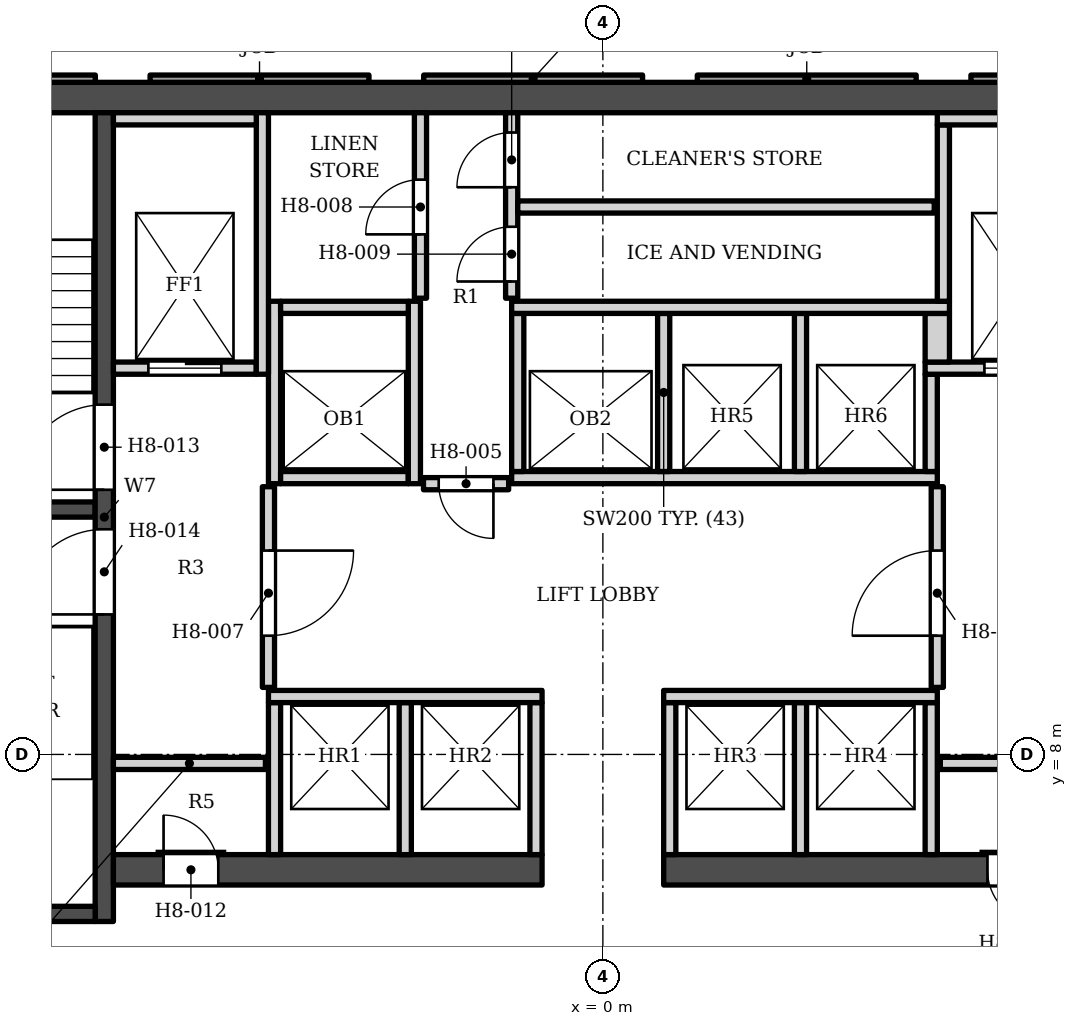
"""IFC4 building model, lengths in metres.
Left out: names, types, materials, properties, quantities, classifications, styles, units other than length and angle.
Written with IfcOpenShell. Run it as: python <this file> out.ifc"""

import sys

from ifc_helpers import new_model, si_unit, direction, frame, frame_2d, origin, place, context, subcontext, project, spatial, polyline, rectangle, outline, extrude, element, fill, save


model = new_model("IFC4")
c1 = context("Model", 3, precision=1e-05, world=origin(), true_north=direction((0.0, 1.0)))
c2 = subcontext(c1, "Body", "Model", "MODEL_VIEW")
j1 = project(units=[si_unit("LENGTHUNIT", "METRE"), si_unit("PLANEANGLEUNIT", "RADIAN")], contexts=[c1])
p1 = place(None, origin())
s1 = spatial("IfcSite", under=j1, at=p1, CompositionType="ELEMENT")
p2 = place(p1, origin())
s2 = spatial("IfcBuilding", under=s1, at=p2, CompositionType="ELEMENT")
p3 = place(p2, frame((0.0, 0.0, 122.4)))
s3 = spatial("IfcBuildingStorey", under=s2, at=p3, CompositionType="ELEMENT", Elevation=122.4)
p4 = place(p3, frame((-16.9, 18.802, 0.0), z_axis=(0.0, 0.0, 1.0), x_axis=(1.0, 0.0, 0.0)))
e1 = element("IfcWall", 1, at=p4, inside=s3, PredefinedType="SHEAR", context=c2, shape_type="SweptSolid", body=[
    extrude(rectangle(XDim=33.8, YDim=0.5, at=frame_2d((16.9, 0.0))), origin(), (0.0, 0.0, 1.0), 3.4),
])
p5 = place(p3, frame((-8.2, 5.253, 0.0), z_axis=(0.0, 0.0, 1.0), x_axis=(0.0, 1.0, 0.0)))
e2 = element("IfcWall", 2, at=p5, inside=s3, PredefinedType="SHEAR", context=c2, shape_type="SweptSolid", body=[
    extrude(rectangle(XDim=13.3, YDim=0.3, at=frame_2d((6.65, 0.0))), origin(), (0.0, 0.0, 1.0), 3.4),
])
p6 = place(p5, frame((7.1, 0.0, 0.0)))
e3 = element("IfcOpeningElement", 3, at=p6, cuts=e2, PredefinedType="OPENING", context=c2, shape_type="SweptSolid", body=[
    extrude(rectangle(XDim=1.4, YDim=2.1, at=frame_2d((0.7, 1.05))), frame((0.0, 0.16, 0.0), z_axis=(0.0, -1.0, 0.0), x_axis=(1.0, 0.0, 0.0)), (0.0, 0.0, 1.0), 0.32),
])
p7 = place(p5, frame((5.05, 0.0, 0.0)))
e4 = element("IfcOpeningElement", 4, at=p7, cuts=e2, PredefinedType="OPENING", context=c2, shape_type="SweptSolid", body=[
    extrude(rectangle(XDim=1.4, YDim=2.1, at=frame_2d((0.7, 1.05))), frame((0.0, 0.16, 0.0), z_axis=(0.0, -1.0, 0.0), x_axis=(1.0, 0.0, 0.0)), (0.0, 0.0, 1.0), 0.32),
])
for number, where, z_axis, x_axis in (
    (5, (-12.1, 12.028, 0.0), (0.0, 0.0, 1.0), (1.0, 0.0, 0.0)),
    (6, (-12.1, 5.378, 0.0), (0.0, 0.0, 1.0), (1.0, 0.0, 0.0)),
):
    element("IfcWall", number, at=place(p3, frame(where, z_axis=z_axis, x_axis=x_axis)), inside=s3, PredefinedType="SHEAR", context=c2, shape_type="SweptSolid", body=[
        extrude(rectangle(XDim=3.75, YDim=0.25, at=frame_2d((1.875, 0.0))), origin(), (0.0, 0.0, 1.0), 3.4),
    ])
p8 = place(p3, frame((-8.05, 6.103, 0.0), z_axis=(0.0, 0.0, 1.0), x_axis=(1.0, 0.0, 0.0)))
e7 = element("IfcWall", 7, at=p8, inside=s3, PredefinedType="SHEAR", context=c2, shape_type="SweptSolid", body=[
    extrude(rectangle(XDim=7.05, YDim=0.5, at=frame_2d((3.525, 0.0))), origin(), (0.0, 0.0, 1.0), 3.4),
])
p9 = place(p8, frame((0.825, 0.0, 0.0)))
e8 = element("IfcOpeningElement", 8, at=p9, cuts=e7, PredefinedType="OPENING", context=c2, shape_type="SweptSolid", body=[
    extrude(rectangle(XDim=0.9, YDim=2.1, at=frame_2d((0.45, 1.05))), frame((0.0, 0.26, 0.0), z_axis=(0.0, -1.0, 0.0), x_axis=(1.0, 0.0, 0.0)), (0.0, 0.0, 1.0), 0.52),
])
p10 = place(p3, frame((1.0, 6.103, 0.0), z_axis=(0.0, 0.0, 1.0), x_axis=(1.0, 0.0, 0.0)))
e9 = element("IfcWall", 9, at=p10, inside=s3, PredefinedType="SHEAR", context=c2, shape_type="SweptSolid", body=[
    extrude(rectangle(XDim=7.05, YDim=0.5, at=frame_2d((3.525, 0.0))), origin(), (0.0, 0.0, 1.0), 3.4),
])
p11 = place(p10, frame((5.325, 0.0, 0.0)))
e10 = element("IfcOpeningElement", 10, at=p11, cuts=e9, PredefinedType="OPENING", context=c2, shape_type="SweptSolid", body=[
    extrude(rectangle(XDim=0.9, YDim=2.1, at=frame_2d((0.45, 1.05))), frame((0.0, 0.26, 0.0), z_axis=(0.0, -1.0, 0.0), x_axis=(1.0, 0.0, 0.0)), (0.0, 0.0, 1.0), 0.52),
])
p12 = place(p3, origin())
e11 = element("IfcWall", 11, at=p12, inside=s3, PredefinedType="ELEMENTEDWALL", context=c2, shape_type="SweptSolid", body=[
    extrude(outline(polyline([(6.053, 19.173), (6.053, 19.052), (9.653, 19.052), (9.653, 19.173), (6.053, 19.173)])), origin(), (0.0, 0.0, 1.0), 2.65),
])
p13 = place(p3, origin())
e12 = element("IfcWall", 12, at=p13, inside=s3, PredefinedType="SOLIDWALL", context=c2, shape_type="SweptSolid", body=[
    extrude(outline(polyline([(1.553, 19.173), (1.553, 19.052), (5.153, 19.052), (5.153, 19.173), (1.553, 19.173)])), origin(), (0.0, 0.0, 1.0), 2.65),
])
p14 = place(p3, origin())
e13 = element("IfcWall", 13, at=p14, inside=s3, PredefinedType="ELEMENTEDWALL", context=c2, shape_type="SweptSolid", body=[
    extrude(outline(polyline([(-2.947, 19.173), (-2.947, 19.052), (0.653, 19.052), (0.653, 19.173), (-2.947, 19.173)])), origin(), (0.0, 0.0, 1.0), 2.65),
])
p15 = place(p3, origin())
e14 = element("IfcWall", 14, at=p15, inside=s3, PredefinedType="SOLIDWALL", context=c2, shape_type="SweptSolid", body=[
    extrude(outline(polyline([(-7.447, 19.173), (-7.447, 19.052), (-3.847, 19.052), (-3.847, 19.173), (-7.447, 19.173)])), origin(), (0.0, 0.0, 1.0), 2.65),
])
p16 = place(p3, origin())
e15 = element("IfcWall", 15, at=p16, inside=s3, PredefinedType="ELEMENTEDWALL", context=c2, shape_type="SweptSolid", body=[
    extrude(outline(polyline([(-11.947, 19.173), (-11.947, 19.052), (-8.347, 19.052), (-8.347, 19.173), (-11.947, 19.173)])), origin(), (0.0, 0.0, 1.0), 2.65),
])
for number, where, z_axis, x_axis in (
    (16, (-5.4, 6.353, 0.0), (0.0, 0.0, 1.0), (0.0, 1.0, 0.0)),
    (17, (-3.25, 6.353, 0.0), (0.0, 0.0, 1.0), (0.0, 1.0, 0.0)),
    (18, (-1.1, 6.353, 0.0), (0.0, 0.0, 1.0), (0.0, 1.0, 0.0)),
    (19, (1.1, 6.353, 0.0), (0.0, 0.0, 1.0), (0.0, 1.0, 0.0)),
    (20, (3.25, 6.353, 0.0), (0.0, 0.0, 1.0), (0.0, 1.0, 0.0)),
    (21, (5.4, 6.353, 0.0), (0.0, 0.0, 1.0), (0.0, 1.0, 0.0)),
    (22, (-8.05, 7.853, 0.0), (0.0, 0.0, 1.0), (1.0, 0.0, 0.0)),
    (23, (5.55, 7.853, 0.0), (0.0, 0.0, 1.0), (1.0, 0.0, 0.0)),
):
    element("IfcWall", number, at=place(p3, frame(where, z_axis=z_axis, x_axis=x_axis)), inside=s3, PredefinedType="SOLIDWALL", context=c2, shape_type="SweptSolid", body=[
        extrude(rectangle(XDim=2.5, YDim=0.2, at=frame_2d((1.25, 0.0))), origin(), (0.0, 0.0, 1.0), 3.23),
    ])
for number, where, z_axis, x_axis in (
    (24, (-5.5, 8.953, 0.0), (0.0, 0.0, 1.0), (1.0, 0.0, 0.0)),
    (25, (1.0, 8.953, 0.0), (0.0, 0.0, 1.0), (1.0, 0.0, 0.0)),
):
    element("IfcWall", number, at=place(p3, frame(where, z_axis=z_axis, x_axis=x_axis)), inside=s3, PredefinedType="SOLIDWALL", context=c2, shape_type="SweptSolid", body=[
        extrude(rectangle(XDim=4.5, YDim=0.2, at=frame_2d((2.25, 0.0))), origin(), (0.0, 0.0, 1.0), 3.23),
    ])
p17 = place(p3, frame((-5.5, 9.103, 0.0), z_axis=(0.0, 0.0, 1.0), x_axis=(0.0, 1.0, 0.0)))
e26 = element("IfcWall", 26, at=p17, inside=s3, PredefinedType="SOLIDWALL", context=c2, shape_type="SweptSolid", body=[
    extrude(rectangle(XDim=3.3, YDim=0.2, at=frame_2d((1.65, 0.0))), origin(), (0.0, 0.0, 1.0), 3.23),
])
p18 = place(p17, frame((0.85, 0.0, 0.0)))
e27 = element("IfcOpeningElement", 27, at=p18, cuts=e26, PredefinedType="OPENING", context=c2, shape_type="SweptSolid", body=[
    extrude(rectangle(XDim=1.4, YDim=2.1, at=frame_2d((0.7, 1.05))), frame((0.0, 0.11, 0.0), z_axis=(0.0, -1.0, 0.0), x_axis=(1.0, 0.0, 0.0)), (0.0, 0.0, 1.0), 0.22),
])
p19 = place(p3, frame((5.5, 9.103, 0.0), z_axis=(0.0, 0.0, 1.0), x_axis=(0.0, 1.0, 0.0)))
e28 = element("IfcWall", 28, at=p19, inside=s3, PredefinedType="SOLIDWALL", context=c2, shape_type="SweptSolid", body=[
    extrude(rectangle(XDim=3.3, YDim=0.2, at=frame_2d((1.65, 0.0))), origin(), (0.0, 0.0, 1.0), 3.23),
])
p20 = place(p19, frame((0.85, 0.0, 0.0)))
e29 = element("IfcOpeningElement", 29, at=p20, cuts=e28, PredefinedType="OPENING", context=c2, shape_type="SweptSolid", body=[
    extrude(rectangle(XDim=1.4, YDim=2.1, at=frame_2d((0.7, 1.05))), frame((0.0, 0.11, 0.0), z_axis=(0.0, -1.0, 0.0), x_axis=(1.0, 0.0, 0.0)), (0.0, 0.0, 1.0), 0.22),
])
p21 = place(p3, frame((-2.95, 12.453, 0.0), z_axis=(0.0, 0.0, 1.0), x_axis=(1.0, 0.0, 0.0)))
e30 = element("IfcWall", 30, at=p21, inside=s3, PredefinedType="SOLIDWALL", context=c2, shape_type="SweptSolid", body=[
    extrude(rectangle(XDim=1.4, YDim=0.2, at=frame_2d((0.7, 0.0))), origin(), (0.0, 0.0, 1.0), 3.23),
])
p22 = place(p21, frame((0.25, 0.0, 0.0)))
e31 = element("IfcOpeningElement", 31, at=p22, cuts=e30, PredefinedType="OPENING", context=c2, shape_type="SweptSolid", body=[
    extrude(rectangle(XDim=0.9, YDim=2.1, at=frame_2d((0.45, 1.05))), frame((0.0, 0.11, 0.0), z_axis=(0.0, -1.0, 0.0), x_axis=(1.0, 0.0, 0.0)), (0.0, 0.0, 1.0), 0.22),
])
p23 = place(p3, frame((-5.4, 12.453, 0.0), z_axis=(0.0, 0.0, 1.0), x_axis=(0.0, 1.0, 0.0)))
e32 = element("IfcWall", 32, at=p23, inside=s3, PredefinedType="SOLIDWALL", context=c2, shape_type="SweptSolid", body=[
    extrude(rectangle(XDim=3.0, YDim=0.2, at=frame_2d((1.5, 0.0))), origin(), (0.0, 0.0, 1.0), 3.23),
])
p24 = place(p3, frame((-5.3, 12.552, 0.0), z_axis=(0.0, 0.0, 1.0), x_axis=(1.0, 0.0, 0.0)))
e33 = element("IfcWall", 33, at=p24, inside=s3, PredefinedType="SOLIDWALL", context=c2, shape_type="SweptSolid", body=[
    extrude(rectangle(XDim=2.1, YDim=0.2, at=frame_2d((1.05, 0.0))), origin(), (0.0, 0.0, 1.0), 3.23),
])
p25 = place(p3, frame((-3.1, 12.453, 0.0), z_axis=(0.0, 0.0, 1.0), x_axis=(0.0, 1.0, 0.0)))
e34 = element("IfcWall", 34, at=p25, inside=s3, PredefinedType="SOLIDWALL", context=c2, shape_type="SweptSolid", body=[
    extrude(rectangle(XDim=3.0, YDim=0.2, at=frame_2d((1.5, 0.0))), origin(), (0.0, 0.0, 1.0), 3.23),
])
p26 = place(p3, frame((-1.5, 12.552, 0.0), z_axis=(0.0, 0.0, 1.0), x_axis=(1.0, 0.0, 0.0)))
e35 = element("IfcWall", 35, at=p26, inside=s3, PredefinedType="SOLIDWALL", context=c2, shape_type="SweptSolid", body=[
    extrude(rectangle(XDim=7.0, YDim=0.2, at=frame_2d((3.5, 0.0))), origin(), (0.0, 0.0, 1.0), 3.23),
])
for number, where, z_axis, x_axis in (
    (36, (-1.4, 12.653, 0.0), (0.0, 0.0, 1.0), (0.0, 1.0, 0.0)),
    (37, (1.0, 12.653, 0.0), (0.0, 0.0, 1.0), (0.0, 1.0, 0.0)),
    (38, (3.25, 12.653, 0.0), (0.0, 0.0, 1.0), (0.0, 1.0, 0.0)),
):
    element("IfcWall", number, at=place(p3, frame(where, z_axis=z_axis, x_axis=x_axis)), inside=s3, PredefinedType="SOLIDWALL", context=c2, shape_type="SweptSolid", body=[
        extrude(rectangle(XDim=2.6, YDim=0.2, at=frame_2d((1.3, 0.0))), origin(), (0.0, 0.0, 1.0), 3.23),
    ])
p27 = place(p3, frame((5.4, 12.653, 0.0), z_axis=(0.0, 0.0, 1.0), x_axis=(0.0, 1.0, 0.0)))
e39 = element("IfcWall", 39, at=p27, inside=s3, PredefinedType="SOLIDWALL", context=c2, shape_type="SweptSolid", body=[
    extrude(rectangle(XDim=1.6, YDim=0.2, at=frame_2d((0.8, 0.0))), origin(), (0.0, 0.0, 1.0), 3.23),
])
p28 = place(p3, frame((-8.05, 14.353, 0.0), z_axis=(0.0, 0.0, 1.0), x_axis=(1.0, 0.0, 0.0)))
e40 = element("IfcWall", 40, at=p28, inside=s3, PredefinedType="SOLIDWALL", context=c2, shape_type="SweptSolid", body=[
    extrude(rectangle(XDim=2.35, YDim=0.2, at=frame_2d((1.175, 0.0))), origin(), (0.0, 0.0, 1.0), 3.23),
])
p29 = place(p28, frame((0.575, 0.0, 0.0)))
e41 = element("IfcOpeningElement", 41, at=p29, cuts=e40, PredefinedType="OPENING", context=c2, shape_type="SweptSolid", body=[
    extrude(rectangle(XDim=1.2, YDim=2.1, at=frame_2d((0.6, 1.05))), frame((0.0, 0.11, 0.0), z_axis=(0.0, -1.0, 0.0), x_axis=(1.0, 0.0, 0.0)), (0.0, 0.0, 1.0), 0.22),
])
p30 = place(p3, frame((-5.6, 14.253, 0.0), z_axis=(0.0, 0.0, 1.0), x_axis=(0.0, 1.0, 0.0)))
e42 = element("IfcWall", 42, at=p30, inside=s3, PredefinedType="SOLIDWALL", context=c2, shape_type="SweptSolid", body=[
    extrude(rectangle(XDim=4.3, YDim=0.2, at=frame_2d((2.15, 0.0))), origin(), (0.0, 0.0, 1.0), 3.23),
])
p31 = place(p3, frame((5.3, 14.353, 0.0), z_axis=(0.0, 0.0, 1.0), x_axis=(1.0, 0.0, 0.0)))
e43 = element("IfcWall", 43, at=p31, inside=s3, PredefinedType="SOLIDWALL", context=c2, shape_type="SweptSolid", body=[
    extrude(rectangle(XDim=2.75, YDim=0.2, at=frame_2d((1.375, 0.0))), origin(), (0.0, 0.0, 1.0), 3.23),
])
p32 = place(p31, frame((0.975, 0.0, 0.0)))
e44 = element("IfcOpeningElement", 44, at=p32, cuts=e43, PredefinedType="OPENING", context=c2, shape_type="SweptSolid", body=[
    extrude(rectangle(XDim=1.2, YDim=2.1, at=frame_2d((0.6, 1.05))), frame((0.0, 0.11, 0.0), z_axis=(0.0, -1.0, 0.0), x_axis=(1.0, 0.0, 0.0)), (0.0, 0.0, 1.0), 0.22),
])
p33 = place(p3, frame((5.5, 14.453, 0.0), z_axis=(0.0, 0.0, 1.0), x_axis=(0.0, 1.0, 0.0)))
e45 = element("IfcWall", 45, at=p33, inside=s3, PredefinedType="SOLIDWALL", context=c2, shape_type="SweptSolid", body=[
    extrude(rectangle(XDim=0.8, YDim=0.4, at=frame_2d((0.4, 0.0))), origin(), (0.0, 0.0, 1.0), 3.23),
])
p34 = place(p3, frame((-5.3, 15.353, 0.0), z_axis=(0.0, 0.0, 1.0), x_axis=(1.0, 0.0, 0.0)))
e46 = element("IfcWall", 46, at=p34, inside=s3, PredefinedType="SOLIDWALL", context=c2, shape_type="SweptSolid", body=[
    extrude(rectangle(XDim=2.1, YDim=0.2, at=frame_2d((1.05, 0.0))), origin(), (0.0, 0.0, 1.0), 3.23),
])
p35 = place(p3, frame((-1.5, 15.353, 0.0), z_axis=(0.0, 0.0, 1.0), x_axis=(1.0, 0.0, 0.0)))
e47 = element("IfcWall", 47, at=p35, inside=s3, PredefinedType="SOLIDWALL", context=c2, shape_type="SweptSolid", body=[
    extrude(rectangle(XDim=7.2, YDim=0.2, at=frame_2d((3.6, 0.0))), origin(), (0.0, 0.0, 1.0), 3.23),
])
p36 = place(p3, frame((5.6, 15.453, 0.0), z_axis=(0.0, 0.0, 1.0), x_axis=(0.0, 1.0, 0.0)))
e48 = element("IfcWall", 48, at=p36, inside=s3, PredefinedType="SOLIDWALL", context=c2, shape_type="SweptSolid", body=[
    extrude(rectangle(XDim=2.9, YDim=0.2, at=frame_2d((1.45, 0.0))), origin(), (0.0, 0.0, 1.0), 3.23),
])
p37 = place(p3, frame((-3.0, 15.503, 0.0), z_axis=(0.0, 0.0, 1.0), x_axis=(0.0, 1.0, 0.0)))
e49 = element("IfcWall", 49, at=p37, inside=s3, PredefinedType="SOLIDWALL", context=c2, shape_type="SweptSolid", body=[
    extrude(rectangle(XDim=3.05, YDim=0.2, at=frame_2d((1.525, 0.0))), origin(), (0.0, 0.0, 1.0), 3.23),
])
p38 = place(p37, frame((1.05, 0.0, 0.0)))
e50 = element("IfcOpeningElement", 50, at=p38, cuts=e49, PredefinedType="OPENING", context=c2, shape_type="SweptSolid", body=[
    extrude(rectangle(XDim=0.9, YDim=2.1, at=frame_2d((0.45, 1.05))), frame((0.0, 0.11, 0.0), z_axis=(0.0, -1.0, 0.0), x_axis=(1.0, 0.0, 0.0)), (0.0, 0.0, 1.0), 0.22),
])
p39 = place(p3, frame((-1.5, 15.503, 0.0), z_axis=(0.0, 0.0, 1.0), x_axis=(0.0, 1.0, 0.0)))
e51 = element("IfcWall", 51, at=p39, inside=s3, PredefinedType="SOLIDWALL", context=c2, shape_type="SweptSolid", body=[
    extrude(rectangle(XDim=3.05, YDim=0.2, at=frame_2d((1.525, 0.0))), origin(), (0.0, 0.0, 1.0), 3.23),
])
p40 = place(p39, frame((0.275, 0.0, 0.0)))
e52 = element("IfcOpeningElement", 52, at=p40, cuts=e51, PredefinedType="OPENING", context=c2, shape_type="SweptSolid", body=[
    extrude(rectangle(XDim=0.9, YDim=2.1, at=frame_2d((0.45, 1.05))), frame((0.0, 0.11, 0.0), z_axis=(0.0, -1.0, 0.0), x_axis=(1.0, 0.0, 0.0)), (0.0, 0.0, 1.0), 0.22),
])
p41 = place(p39, frame((1.825, 0.0, 0.0)))
e53 = element("IfcOpeningElement", 53, at=p41, cuts=e51, PredefinedType="OPENING", context=c2, shape_type="SweptSolid", body=[
    extrude(rectangle(XDim=0.9, YDim=2.1, at=frame_2d((0.45, 1.05))), frame((0.0, 0.11, 0.0), z_axis=(0.0, -1.0, 0.0), x_axis=(1.0, 0.0, 0.0)), (0.0, 0.0, 1.0), 0.22),
])
p42 = place(p3, frame((-1.4, 17.003, 0.0), z_axis=(0.0, 0.0, 1.0), x_axis=(1.0, 0.0, 0.0)))
e54 = element("IfcWall", 54, at=p42, inside=s3, PredefinedType="SOLIDWALL", context=c2, shape_type="SweptSolid", body=[
    extrude(rectangle(XDim=6.85, YDim=0.2, at=frame_2d((3.425, 0.0))), origin(), (0.0, 0.0, 1.0), 3.23),
])
p43 = place(p3, frame((-8.05, 18.453, 0.0), z_axis=(0.0, 0.0, 1.0), x_axis=(1.0, 0.0, 0.0)))
e55 = element("IfcWall", 55, at=p43, inside=s3, PredefinedType="SOLIDWALL", context=c2, shape_type="SweptSolid", body=[
    extrude(rectangle(XDim=2.35, YDim=0.2, at=frame_2d((1.175, 0.0))), origin(), (0.0, 0.0, 1.0), 3.23),
])
p44 = place(p3, frame((5.5, 18.453, 0.0), z_axis=(0.0, 0.0, 1.0), x_axis=(1.0, 0.0, 0.0)))
e56 = element("IfcWall", 56, at=p44, inside=s3, PredefinedType="SOLIDWALL", context=c2, shape_type="SweptSolid", body=[
    extrude(rectangle(XDim=2.55, YDim=0.2, at=frame_2d((1.275, 0.0))), origin(), (0.0, 0.0, 1.0), 3.23),
])
p45 = place(p29, origin())
e57 = element("IfcDoor", 57, at=p45, inside=s3, OperationType="DOUBLE_DOOR_SLIDING", PredefinedType="DOOR", context=c2, shape_type="SweptSolid", body=[
    extrude(rectangle(XDim=1.2, YDim=2.1, at=frame_2d((0.6, 1.05))), frame((0.0, 0.025, 0.0), z_axis=(0.0, -1.0, 0.0), x_axis=(1.0, 0.0, 0.0)), (0.0, 0.0, 1.0), 0.05),
])
fill(e41, e57)
p46 = place(p32, origin())
e58 = element("IfcDoor", 58, at=p46, inside=s3, OperationType="DOUBLE_DOOR_SLIDING", PredefinedType="DOOR", context=c2, shape_type="SweptSolid", body=[
    extrude(rectangle(XDim=1.2, YDim=2.1, at=frame_2d((0.6, 1.05))), frame((0.0, 0.025, 0.0), z_axis=(0.0, -1.0, 0.0), x_axis=(1.0, 0.0, 0.0)), (0.0, 0.0, 1.0), 0.05),
])
fill(e44, e58)
p47 = place(p6, origin())
e59 = element("IfcDoor", 59, at=p47, inside=s3, OperationType="SINGLE_SWING_LEFT", PredefinedType="DOOR", context=c2, shape_type="SweptSolid", body=[
    extrude(rectangle(XDim=1.4, YDim=2.1, at=frame_2d((0.7, 1.05))), frame((0.0, 0.025, 0.0), z_axis=(0.0, -1.0, 0.0), x_axis=(1.0, 0.0, 0.0)), (0.0, 0.0, 1.0), 0.05),
])
fill(e3, e59)
p48 = place(p7, origin())
e60 = element("IfcDoor", 60, at=p48, inside=s3, OperationType="SINGLE_SWING_LEFT", PredefinedType="DOOR", context=c2, shape_type="SweptSolid", body=[
    extrude(rectangle(XDim=1.4, YDim=2.1, at=frame_2d((0.7, 1.05))), frame((0.0, 0.025, 0.0), z_axis=(0.0, -1.0, 0.0), x_axis=(1.0, 0.0, 0.0)), (0.0, 0.0, 1.0), 0.05),
])
fill(e4, e60)
p49 = place(p22, origin())
e61 = element("IfcDoor", 61, at=p49, inside=s3, OperationType="SINGLE_SWING_RIGHT", PredefinedType="DOOR", context=c2, shape_type="SweptSolid", body=[
    extrude(rectangle(XDim=0.9, YDim=2.1, at=frame_2d((0.45, 1.05))), frame((0.0, 0.025, 0.0), z_axis=(0.0, -1.0, 0.0), x_axis=(1.0, 0.0, 0.0)), (0.0, 0.0, 1.0), 0.05),
])
fill(e31, e61)
p50 = place(p18, origin())
e62 = element("IfcDoor", 62, at=p50, inside=s3, OperationType="SINGLE_SWING_RIGHT", PredefinedType="DOOR", context=c2, shape_type="SweptSolid", body=[
    extrude(rectangle(XDim=1.4, YDim=2.1, at=frame_2d((0.7, 1.05))), frame((0.0, 0.025, 0.0), z_axis=(0.0, -1.0, 0.0), x_axis=(1.0, 0.0, 0.0)), (0.0, 0.0, 1.0), 0.05),
])
fill(e27, e62)
p51 = place(p20, origin())
e63 = element("IfcDoor", 63, at=p51, inside=s3, OperationType="SINGLE_SWING_LEFT", PredefinedType="DOOR", context=c2, shape_type="SweptSolid", body=[
    extrude(rectangle(XDim=1.4, YDim=2.1, at=frame_2d((0.7, 1.05))), frame((0.0, 0.025, 0.0), z_axis=(0.0, -1.0, 0.0), x_axis=(1.0, 0.0, 0.0)), (0.0, 0.0, 1.0), 0.05),
])
fill(e29, e63)
p52 = place(p38, origin())
e64 = element("IfcDoor", 64, at=p52, inside=s3, OperationType="SINGLE_SWING_LEFT", PredefinedType="DOOR", context=c2, shape_type="SweptSolid", body=[
    extrude(rectangle(XDim=0.9, YDim=2.1, at=frame_2d((0.45, 1.05))), frame((0.0, 0.025, 0.0), z_axis=(0.0, -1.0, 0.0), x_axis=(1.0, 0.0, 0.0)), (0.0, 0.0, 1.0), 0.05),
])
fill(e50, e64)
p53 = place(p40, origin())
e65 = element("IfcDoor", 65, at=p53, inside=s3, OperationType="SINGLE_SWING_LEFT", PredefinedType="DOOR", context=c2, shape_type="SweptSolid", body=[
    extrude(rectangle(XDim=0.9, YDim=2.1, at=frame_2d((0.45, 1.05))), frame((0.0, 0.025, 0.0), z_axis=(0.0, -1.0, 0.0), x_axis=(1.0, 0.0, 0.0)), (0.0, 0.0, 1.0), 0.05),
])
fill(e52, e65)
p54 = place(p41, origin())
e66 = element("IfcDoor", 66, at=p54, inside=s3, OperationType="SINGLE_SWING_LEFT", PredefinedType="DOOR", context=c2, shape_type="SweptSolid", body=[
    extrude(rectangle(XDim=0.9, YDim=2.1, at=frame_2d((0.45, 1.05))), frame((0.0, 0.025, 0.0), z_axis=(0.0, -1.0, 0.0), x_axis=(1.0, 0.0, 0.0)), (0.0, 0.0, 1.0), 0.05),
])
fill(e53, e66)
p55 = place(p9, origin())
e67 = element("IfcDoor", 67, at=p55, inside=s3, OperationType="SINGLE_SWING_LEFT", PredefinedType="DOOR", context=c2, shape_type="SweptSolid", body=[
    extrude(rectangle(XDim=0.9, YDim=2.1, at=frame_2d((0.45, 1.05))), frame((0.0, 0.025, 0.0), z_axis=(0.0, -1.0, 0.0), x_axis=(1.0, 0.0, 0.0)), (0.0, 0.0, 1.0), 0.05),
])
fill(e8, e67)
p56 = place(p11, origin())
e68 = element("IfcDoor", 68, at=p56, inside=s3, OperationType="SINGLE_SWING_RIGHT", PredefinedType="DOOR", context=c2, shape_type="SweptSolid", body=[
    extrude(rectangle(XDim=0.9, YDim=2.1, at=frame_2d((0.45, 1.05))), frame((0.0, 0.025, 0.0), z_axis=(0.0, -1.0, 0.0), x_axis=(1.0, 0.0, 0.0)), (0.0, 0.0, 1.0), 0.05),
])
fill(e10, e68)
save(model, sys.argv[1])
